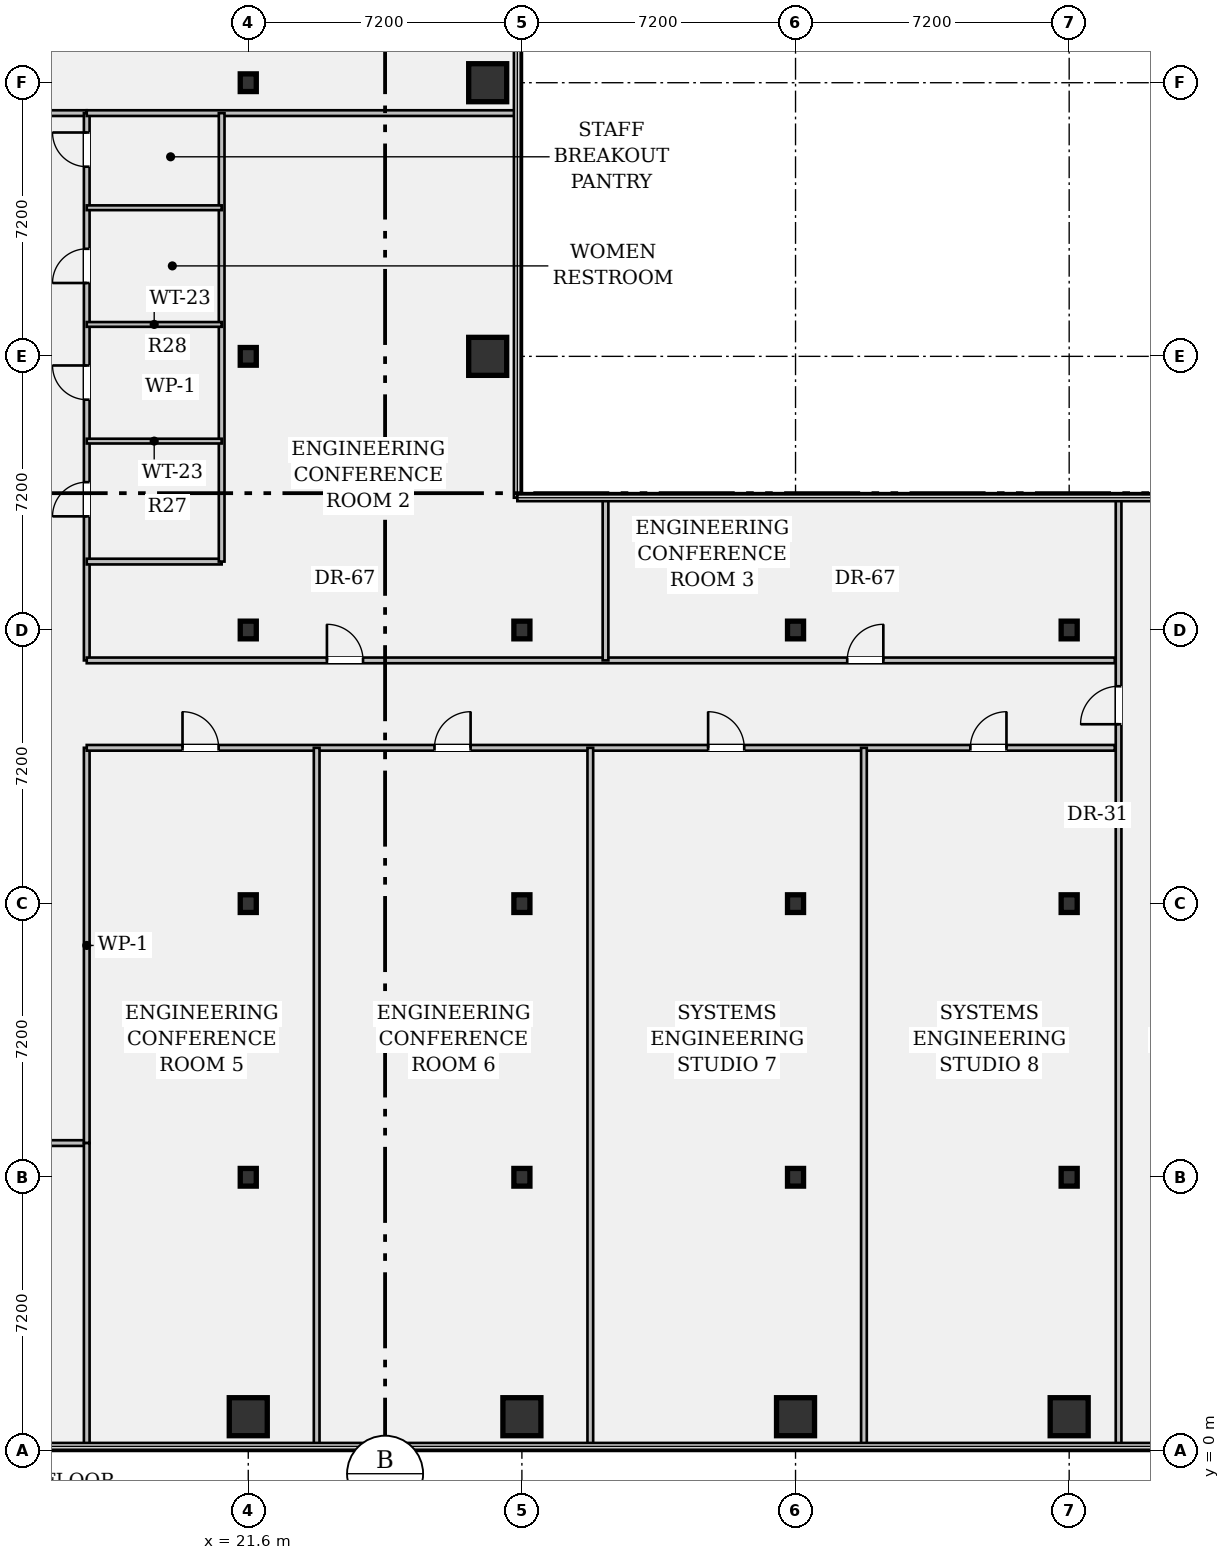
"""IFC4 building model, lengths in metres.
Left out: names, types, materials, properties, quantities, classifications, styles, units other than length and angle.
Written with IfcOpenShell. Run it as: python <this file> out.ifc"""

import sys

from ifc_helpers import new_model, si_unit, direction, frame, frame_2d, origin, origin_2d, place, context, subcontext, project, spatial, rectangle, hollow_rectangle, i_section, extrude, element, fill, save


model = new_model("IFC4")
c1 = context("Model", 3, precision=1e-05, world=origin(), true_north=direction((0.0, 1.0)))
c2 = subcontext(c1, "Body", "Model", "MODEL_VIEW")
j1 = project(units=[si_unit("LENGTHUNIT", "METRE"), si_unit("PLANEANGLEUNIT", "RADIAN")], contexts=[c1])
p1 = place(None, origin())
s1 = spatial("IfcSite", under=j1, at=p1, CompositionType="ELEMENT")
p2 = place(p1, origin())
s2 = spatial("IfcBuilding", under=s1, at=p2, CompositionType="ELEMENT")
p3 = place(p2, frame((0.0, 0.0, 54.25)))
s3 = spatial("IfcBuildingStorey", under=s2, at=p3, CompositionType="ELEMENT", Elevation=54.25)
p4 = place(p3, frame((21.6, 0.9, 0.0), z_axis=(0.0, 0.0, 1.0), x_axis=(1.0, 0.0, 0.0)))
e1 = element("IfcColumn", 1, at=p4, inside=s3, PredefinedType="COLUMN", context=c2, shape_type="SweptSolid", body=[
    extrude(hollow_rectangle(XDim=1.0, YDim=1.0, WallThickness=0.065, at=origin_2d()), origin(), (0.0, 0.0, 1.0), 3.57),
])
for number, where, z_axis, x_axis in (
    (2, (21.6, 7.2, 0.0), (0.0, 0.0, 1.0), (1.0, 0.0, 0.0)),
    (3, (21.6, 14.4, 0.0), (0.0, 0.0, 1.0), (1.0, 0.0, 0.0)),
    (4, (21.6, 21.6, 0.0), (0.0, 0.0, 1.0), (1.0, 0.0, 0.0)),
    (5, (21.6, 28.8, 0.0), (0.0, 0.0, 1.0), (1.0, 0.0, 0.0)),
    (6, (21.6, 36.0, 0.0), (0.0, 0.0, 1.0), (1.0, 0.0, 0.0)),
):
    element("IfcColumn", number, at=place(p3, frame(where, z_axis=z_axis, x_axis=x_axis)), inside=s3, PredefinedType="COLUMN", context=c2, shape_type="SweptSolid", body=[
        extrude(i_section(OverallWidth=0.422, OverallDepth=0.465, WebThickness=0.045, FlangeThickness=0.073, FilletRadius=0.018, at=origin_2d()), origin(), (0.0, 0.0, 1.0), 3.57),
    ])
for number, where, z_axis, x_axis in (
    (7, (27.9, 28.8, 0.0), (0.0, 0.0, 1.0), (1.0, 0.0, 0.0)),
    (8, (27.9, 36.0, 0.0), (0.0, 0.0, 1.0), (1.0, 0.0, 0.0)),
    (9, (28.8, 0.9, 0.0), (0.0, 0.0, 1.0), (1.0, 0.0, 0.0)),
):
    element("IfcColumn", number, at=place(p3, frame(where, z_axis=z_axis, x_axis=x_axis)), inside=s3, PredefinedType="COLUMN", context=c2, shape_type="SweptSolid", body=[
        extrude(hollow_rectangle(XDim=1.0, YDim=1.0, WallThickness=0.065, at=origin_2d()), origin(), (0.0, 0.0, 1.0), 3.57),
    ])
for number, where, z_axis, x_axis in (
    (10, (28.8, 7.2, 0.0), (0.0, 0.0, 1.0), (1.0, 0.0, 0.0)),
    (11, (28.8, 14.4, 0.0), (0.0, 0.0, 1.0), (1.0, 0.0, 0.0)),
    (12, (28.8, 21.6, 0.0), (0.0, 0.0, 1.0), (1.0, 0.0, 0.0)),
):
    element("IfcColumn", number, at=place(p3, frame(where, z_axis=z_axis, x_axis=x_axis)), inside=s3, PredefinedType="COLUMN", context=c2, shape_type="SweptSolid", body=[
        extrude(i_section(OverallWidth=0.422, OverallDepth=0.465, WebThickness=0.045, FlangeThickness=0.073, FilletRadius=0.018, at=origin_2d()), origin(), (0.0, 0.0, 1.0), 3.57),
    ])
p5 = place(p3, frame((36.0, 0.9, 0.0), z_axis=(0.0, 0.0, 1.0), x_axis=(1.0, 0.0, 0.0)))
e13 = element("IfcColumn", 13, at=p5, inside=s3, PredefinedType="COLUMN", context=c2, shape_type="SweptSolid", body=[
    extrude(hollow_rectangle(XDim=1.0, YDim=1.0, WallThickness=0.065, at=origin_2d()), origin(), (0.0, 0.0, 1.0), 3.57),
])
for number, where, z_axis, x_axis in (
    (14, (36.0, 7.2, 0.0), (0.0, 0.0, 1.0), (1.0, 0.0, 0.0)),
    (15, (36.0, 14.4, 0.0), (0.0, 0.0, 1.0), (1.0, 0.0, 0.0)),
    (16, (36.0, 21.6, 0.0), (0.0, 0.0, 1.0), (1.0, 0.0, 0.0)),
):
    element("IfcColumn", number, at=place(p3, frame(where, z_axis=z_axis, x_axis=x_axis)), inside=s3, PredefinedType="COLUMN", context=c2, shape_type="SweptSolid", body=[
        extrude(i_section(OverallWidth=0.422, OverallDepth=0.465, WebThickness=0.045, FlangeThickness=0.073, FilletRadius=0.018, at=origin_2d()), origin(), (0.0, 0.0, 1.0), 3.57),
    ])
p6 = place(p3, frame((43.2, 0.9, 0.0), z_axis=(0.0, 0.0, 1.0), x_axis=(1.0, 0.0, 0.0)))
e17 = element("IfcColumn", 17, at=p6, inside=s3, PredefinedType="COLUMN", context=c2, shape_type="SweptSolid", body=[
    extrude(hollow_rectangle(XDim=1.0, YDim=1.0, WallThickness=0.065, at=origin_2d()), origin(), (0.0, 0.0, 1.0), 3.57),
])
for number, where, z_axis, x_axis in (
    (18, (43.2, 7.2, 0.0), (0.0, 0.0, 1.0), (1.0, 0.0, 0.0)),
    (19, (43.2, 14.4, 0.0), (0.0, 0.0, 1.0), (1.0, 0.0, 0.0)),
    (20, (43.2, 21.6, 0.0), (0.0, 0.0, 1.0), (1.0, 0.0, 0.0)),
):
    element("IfcColumn", number, at=place(p3, frame(where, z_axis=z_axis, x_axis=x_axis)), inside=s3, PredefinedType="COLUMN", context=c2, shape_type="SweptSolid", body=[
        extrude(i_section(OverallWidth=0.422, OverallDepth=0.465, WebThickness=0.045, FlangeThickness=0.073, FilletRadius=0.018, at=origin_2d()), origin(), (0.0, 0.0, 1.0), 3.57),
    ])
p7 = place(p3, frame((14.4, 8.1, 0.0), z_axis=(0.0, 0.0, 1.0), x_axis=(1.0, 0.0, 0.0)))
e21 = element("IfcWall", 21, at=p7, inside=s3, PredefinedType="PARTITIONING", context=c2, shape_type="SweptSolid", body=[
    extrude(rectangle(XDim=2.95, YDim=0.15, at=frame_2d((1.475, 0.0))), origin(), (0.0, 0.0, 1.0), 3.088),
])
p8 = place(p7, frame((0.95, 0.0, 0.0)))
e22 = element("IfcOpeningElement", 22, at=p8, cuts=e21, PredefinedType="OPENING", context=c2, shape_type="SweptSolid", body=[
    extrude(rectangle(XDim=0.95, YDim=2.15, at=frame_2d((0.475, 1.075))), frame((0.0, 0.087, 0.0), z_axis=(0.0, -1.0, 0.0), x_axis=(1.0, 0.0, 0.0)), (0.0, 0.0, 1.0), 0.174),
])
p9 = place(p3, frame((14.4, 35.2, 0.0), z_axis=(0.0, 0.0, 1.0), x_axis=(1.0, 0.0, 0.0)))
e23 = element("IfcWall", 23, at=p9, inside=s3, PredefinedType="PARTITIONING", context=c2, shape_type="SweptSolid", body=[
    extrude(rectangle(XDim=2.95, YDim=0.15, at=frame_2d((1.475, 0.0))), origin(), (0.0, 0.0, 1.0), 3.088),
])
p10 = place(p9, frame((0.95, 0.0, 0.0)))
e24 = element("IfcOpeningElement", 24, at=p10, cuts=e23, PredefinedType="OPENING", context=c2, shape_type="SweptSolid", body=[
    extrude(rectangle(XDim=1.0, YDim=2.15, at=frame_2d((0.5, 1.075))), frame((0.0, 0.087, 0.0), z_axis=(0.0, -1.0, 0.0), x_axis=(1.0, 0.0, 0.0)), (0.0, 0.0, 1.0), 0.174),
])
p11 = place(p3, frame((17.35, 8.1, 0.0), z_axis=(0.0, 0.0, 1.0), x_axis=(0.0, 1.0, 0.0)))
e25 = element("IfcWall", 25, at=p11, inside=s3, PredefinedType="PARTITIONING", context=c2, shape_type="SweptSolid", body=[
    extrude(rectangle(XDim=10.4, YDim=0.15, at=frame_2d((5.2, 0.0))), origin(), (0.0, 0.0, 1.0), 2.699),
])
p12 = place(p3, frame((17.35, 20.8, 0.0), z_axis=(0.0, 0.0, 1.0), x_axis=(0.0, 1.0, 0.0)))
e26 = element("IfcWall", 26, at=p12, inside=s3, PredefinedType="PARTITIONING", context=c2, shape_type="SweptSolid", body=[
    extrude(rectangle(XDim=14.4, YDim=0.15, at=frame_2d((7.2, 0.0))), origin(), (0.0, 0.0, 1.0), 2.699),
])
p13 = place(p12, frame((3.79, 0.0, 0.0)))
e27 = element("IfcOpeningElement", 27, at=p13, cuts=e26, PredefinedType="OPENING", context=c2, shape_type="SweptSolid", body=[
    extrude(rectangle(XDim=0.9, YDim=2.15, at=frame_2d((0.45, 1.075))), frame((0.0, 0.087, 0.0), z_axis=(0.0, -1.0, 0.0), x_axis=(1.0, 0.0, 0.0)), (0.0, 0.0, 1.0), 0.174),
])
p14 = place(p12, frame((6.86, 0.0, 0.0)))
e28 = element("IfcOpeningElement", 28, at=p14, cuts=e26, PredefinedType="OPENING", context=c2, shape_type="SweptSolid", body=[
    extrude(rectangle(XDim=0.9, YDim=2.15, at=frame_2d((0.45, 1.075))), frame((0.0, 0.087, 0.0), z_axis=(0.0, -1.0, 0.0), x_axis=(1.0, 0.0, 0.0)), (0.0, 0.0, 1.0), 0.174),
])
p15 = place(p12, frame((9.93, 0.0, 0.0)))
e29 = element("IfcOpeningElement", 29, at=p15, cuts=e26, PredefinedType="OPENING", context=c2, shape_type="SweptSolid", body=[
    extrude(rectangle(XDim=0.9, YDim=2.15, at=frame_2d((0.45, 1.075))), frame((0.0, 0.087, 0.0), z_axis=(0.0, -1.0, 0.0), x_axis=(1.0, 0.0, 0.0)), (0.0, 0.0, 1.0), 0.174),
])
p16 = place(p12, frame((12.99, 0.0, 0.0)))
e30 = element("IfcOpeningElement", 30, at=p16, cuts=e26, PredefinedType="OPENING", context=c2, shape_type="SweptSolid", body=[
    extrude(rectangle(XDim=0.9, YDim=2.15, at=frame_2d((0.45, 1.075))), frame((0.0, 0.087, 0.0), z_axis=(0.0, -1.0, 0.0), x_axis=(1.0, 0.0, 0.0)), (0.0, 0.0, 1.0), 0.174),
])
p17 = place(p3, frame((17.35, 18.5, 0.0), z_axis=(0.0, 0.0, 1.0), x_axis=(1.0, 0.0, 0.0)))
e31 = element("IfcWall", 31, at=p17, inside=s3, PredefinedType="PARTITIONING", context=c2, shape_type="SweptSolid", body=[
    extrude(rectangle(XDim=27.05, YDim=0.15, at=frame_2d((13.525, 0.0))), origin(), (0.0, 0.0, 1.0), 2.699),
])
p18 = place(p17, frame((2.52, 0.0, 0.0)))
e32 = element("IfcOpeningElement", 32, at=p18, cuts=e31, PredefinedType="OPENING", context=c2, shape_type="SweptSolid", body=[
    extrude(rectangle(XDim=0.95, YDim=2.15, at=frame_2d((0.475, 1.075))), frame((0.0, 0.087, 0.0), z_axis=(0.0, -1.0, 0.0), x_axis=(1.0, 0.0, 0.0)), (0.0, 0.0, 1.0), 0.174),
])
p19 = place(p17, frame((9.15, 0.0, 0.0)))
e33 = element("IfcOpeningElement", 33, at=p19, cuts=e31, PredefinedType="OPENING", context=c2, shape_type="SweptSolid", body=[
    extrude(rectangle(XDim=0.95, YDim=2.15, at=frame_2d((0.475, 1.075))), frame((0.0, 0.087, 0.0), z_axis=(0.0, -1.0, 0.0), x_axis=(1.0, 0.0, 0.0)), (0.0, 0.0, 1.0), 0.174),
])
p20 = place(p17, frame((16.35, 0.0, 0.0)))
e34 = element("IfcOpeningElement", 34, at=p20, cuts=e31, PredefinedType="OPENING", context=c2, shape_type="SweptSolid", body=[
    extrude(rectangle(XDim=0.95, YDim=2.15, at=frame_2d((0.475, 1.075))), frame((0.0, 0.087, 0.0), z_axis=(0.0, -1.0, 0.0), x_axis=(1.0, 0.0, 0.0)), (0.0, 0.0, 1.0), 0.174),
])
p21 = place(p17, frame((23.25, 0.0, 0.0)))
e35 = element("IfcOpeningElement", 35, at=p21, cuts=e31, PredefinedType="OPENING", context=c2, shape_type="SweptSolid", body=[
    extrude(rectangle(XDim=0.95, YDim=2.15, at=frame_2d((0.475, 1.075))), frame((0.0, 0.087, 0.0), z_axis=(0.0, -1.0, 0.0), x_axis=(1.0, 0.0, 0.0)), (0.0, 0.0, 1.0), 0.174),
])
p22 = place(p3, frame((17.35, 20.8, 0.0), z_axis=(0.0, 0.0, 1.0), x_axis=(1.0, 0.0, 0.0)))
e36 = element("IfcWall", 36, at=p22, inside=s3, PredefinedType="PARTITIONING", context=c2, shape_type="SweptSolid", body=[
    extrude(rectangle(XDim=27.05, YDim=0.15, at=frame_2d((13.525, 0.0))), origin(), (0.0, 0.0, 1.0), 2.699),
])
p23 = place(p22, frame((6.32, 0.0, 0.0)))
e37 = element("IfcOpeningElement", 37, at=p23, cuts=e36, PredefinedType="OPENING", context=c2, shape_type="SweptSolid", body=[
    extrude(rectangle(XDim=0.95, YDim=2.15, at=frame_2d((0.475, 1.075))), frame((0.0, 0.087, 0.0), z_axis=(0.0, -1.0, 0.0), x_axis=(1.0, 0.0, 0.0)), (0.0, 0.0, 1.0), 0.174),
])
p24 = place(p22, frame((20.01, 0.0, 0.0)))
e38 = element("IfcOpeningElement", 38, at=p24, cuts=e36, PredefinedType="OPENING", context=c2, shape_type="SweptSolid", body=[
    extrude(rectangle(XDim=0.95, YDim=2.15, at=frame_2d((0.475, 1.075))), frame((0.0, 0.087, 0.0), z_axis=(0.0, -1.0, 0.0), x_axis=(1.0, 0.0, 0.0)), (0.0, 0.0, 1.0), 0.174),
])
p25 = place(p3, frame((44.5, 0.12, 0.0), z_axis=(0.0, 0.0, 1.0), x_axis=(0.0, 1.0, 0.0)))
e39 = element("IfcWall", 39, at=p25, inside=s3, PredefinedType="PARTITIONING", context=c2, shape_type="SweptSolid", body=[
    extrude(rectangle(XDim=24.96, YDim=0.15, at=frame_2d((12.48, 0.0))), origin(), (0.0, 0.0, 1.0), 2.699),
])
p26 = place(p25, frame((19.0, 0.0, 0.0)))
e40 = element("IfcOpeningElement", 40, at=p26, cuts=e39, PredefinedType="OPENING", context=c2, shape_type="SweptSolid", body=[
    extrude(rectangle(XDim=1.0, YDim=2.15, at=frame_2d((0.5, 1.075))), frame((0.0, 0.087, 0.0), z_axis=(0.0, -1.0, 0.0), x_axis=(1.0, 0.0, 0.0)), (0.0, 0.0, 1.0), 0.174),
])
p27 = place(p3, frame((17.35, 35.2, 0.0), z_axis=(0.0, 0.0, 1.0), x_axis=(1.0, 0.0, 0.0)))
e41 = element("IfcWall", 41, at=p27, inside=s3, PredefinedType="PARTITIONING", context=c2, shape_type="SweptSolid", body=[
    extrude(rectangle(XDim=11.33, YDim=0.15, at=frame_2d((5.665, 0.0))), origin(), (0.0, 0.0, 1.0), 2.699),
])
p28 = place(p3, frame((17.35, 23.4, 0.0), z_axis=(0.0, 0.0, 1.0), x_axis=(1.0, 0.0, 0.0)))
e42 = element("IfcWall", 42, at=p28, inside=s3, PredefinedType="PARTITIONING", context=c2, shape_type="SweptSolid", body=[
    extrude(rectangle(XDim=3.55, YDim=0.15, at=frame_2d((1.775, 0.0))), origin(), (0.0, 0.0, 1.0), 3.088),
])
p29 = place(p3, frame((20.9, 23.4, 0.0), z_axis=(0.0, 0.0, 1.0), x_axis=(0.0, 1.0, 0.0)))
e43 = element("IfcWall", 43, at=p29, inside=s3, PredefinedType="PARTITIONING", context=c2, shape_type="SweptSolid", body=[
    extrude(rectangle(XDim=11.8, YDim=0.15, at=frame_2d((5.9, 0.0))), origin(), (0.0, 0.0, 1.0), 2.699),
])
for number, where, z_axis, x_axis in (
    (44, (17.35, 26.57, 0.0), (0.0, 0.0, 1.0), (1.0, 0.0, 0.0)),
    (45, (17.35, 29.64, 0.0), (0.0, 0.0, 1.0), (1.0, 0.0, 0.0)),
    (46, (17.35, 32.71, 0.0), (0.0, 0.0, 1.0), (1.0, 0.0, 0.0)),
):
    element("IfcWall", number, at=place(p3, frame(where, z_axis=z_axis, x_axis=x_axis)), inside=s3, PredefinedType="PARTITIONING", context=c2, shape_type="SweptSolid", body=[
        extrude(rectangle(XDim=3.55, YDim=0.125, at=frame_2d((1.775, 0.0))), origin(), (0.0, 0.0, 1.0), 3.088),
    ])
p30 = place(p3, frame((31.0, 20.8, 0.0), z_axis=(0.0, 0.0, 1.0), x_axis=(0.0, 1.0, 0.0)))
e47 = element("IfcWall", 47, at=p30, inside=s3, PredefinedType="PARTITIONING", context=c2, shape_type="SweptSolid", body=[
    extrude(rectangle(XDim=4.25, YDim=0.15, at=frame_2d((2.125, 0.0))), origin(), (0.0, 0.0, 1.0), 2.699),
])
p31 = place(p3, frame((17.35, 0.12, 0.0), z_axis=(0.0, 0.0, 1.0), x_axis=(0.0, 1.0, 0.0)))
e48 = element("IfcWall", 48, at=p31, inside=s3, PredefinedType="PARTITIONING", context=c2, shape_type="SweptSolid", body=[
    extrude(rectangle(XDim=7.98, YDim=0.15, at=frame_2d((3.99, 0.0))), origin(), (0.0, 0.0, 1.0), 2.699),
])
for number, where, z_axis, x_axis in (
    (49, (23.4, 0.12, 0.0), (0.0, 0.0, 1.0), (0.0, 1.0, 0.0)),
    (50, (30.6, 0.12, 0.0), (0.0, 0.0, 1.0), (0.0, 1.0, 0.0)),
    (51, (37.8, 0.12, 0.0), (0.0, 0.0, 1.0), (0.0, 1.0, 0.0)),
):
    element("IfcWall", number, at=place(p3, frame(where, z_axis=z_axis, x_axis=x_axis)), inside=s3, PredefinedType="PARTITIONING", context=c2, shape_type="SweptSolid", body=[
        extrude(rectangle(XDim=18.38, YDim=0.15, at=frame_2d((9.19, 0.0))), origin(), (0.0, 0.0, 1.0), 2.699),
    ])
p32 = place(p13, origin())
e52 = element("IfcDoor", 52, at=p32, inside=s3, OperationType="SINGLE_SWING_LEFT", PredefinedType="DOOR", context=c2, shape_type="SweptSolid", body=[
    extrude(rectangle(XDim=0.9, YDim=2.15, at=frame_2d((0.45, 1.075))), frame((0.0, 0.025, 0.0), z_axis=(0.0, -1.0, 0.0), x_axis=(1.0, 0.0, 0.0)), (0.0, 0.0, 1.0), 0.05),
])
fill(e27, e52)
p33 = place(p14, origin())
e53 = element("IfcDoor", 53, at=p33, inside=s3, OperationType="SINGLE_SWING_RIGHT", PredefinedType="DOOR", context=c2, shape_type="SweptSolid", body=[
    extrude(rectangle(XDim=0.9, YDim=2.15, at=frame_2d((0.45, 1.075))), frame((0.0, 0.025, 0.0), z_axis=(0.0, -1.0, 0.0), x_axis=(1.0, 0.0, 0.0)), (0.0, 0.0, 1.0), 0.05),
])
fill(e28, e53)
p34 = place(p15, origin())
e54 = element("IfcDoor", 54, at=p34, inside=s3, OperationType="SINGLE_SWING_LEFT", PredefinedType="DOOR", context=c2, shape_type="SweptSolid", body=[
    extrude(rectangle(XDim=0.9, YDim=2.15, at=frame_2d((0.45, 1.075))), frame((0.0, 0.025, 0.0), z_axis=(0.0, -1.0, 0.0), x_axis=(1.0, 0.0, 0.0)), (0.0, 0.0, 1.0), 0.05),
])
fill(e29, e54)
p35 = place(p16, origin())
e55 = element("IfcDoor", 55, at=p35, inside=s3, OperationType="SINGLE_SWING_RIGHT", PredefinedType="DOOR", context=c2, shape_type="SweptSolid", body=[
    extrude(rectangle(XDim=0.9, YDim=2.15, at=frame_2d((0.45, 1.075))), frame((0.0, 0.025, 0.0), z_axis=(0.0, -1.0, 0.0), x_axis=(1.0, 0.0, 0.0)), (0.0, 0.0, 1.0), 0.05),
])
fill(e30, e55)
p36 = place(p23, origin())
e56 = element("IfcDoor", 56, at=p36, inside=s3, OperationType="SINGLE_SWING_LEFT", PredefinedType="DOOR", context=c2, shape_type="SweptSolid", body=[
    extrude(rectangle(XDim=0.95, YDim=2.15, at=frame_2d((0.475, 1.075))), frame((0.0, 0.025, 0.0), z_axis=(0.0, -1.0, 0.0), x_axis=(1.0, 0.0, 0.0)), (0.0, 0.0, 1.0), 0.05),
])
fill(e37, e56)
p37 = place(p24, origin())
e57 = element("IfcDoor", 57, at=p37, inside=s3, OperationType="SINGLE_SWING_RIGHT", PredefinedType="DOOR", context=c2, shape_type="SweptSolid", body=[
    extrude(rectangle(XDim=0.95, YDim=2.15, at=frame_2d((0.475, 1.075))), frame((0.0, 0.025, 0.0), z_axis=(0.0, -1.0, 0.0), x_axis=(1.0, 0.0, 0.0)), (0.0, 0.0, 1.0), 0.05),
])
fill(e38, e57)
p38 = place(p18, origin())
e58 = element("IfcDoor", 58, at=p38, inside=s3, OperationType="SINGLE_SWING_LEFT", PredefinedType="DOOR", context=c2, shape_type="SweptSolid", body=[
    extrude(rectangle(XDim=0.95, YDim=2.15, at=frame_2d((0.475, 1.075))), frame((0.0, 0.025, 0.0), z_axis=(0.0, -1.0, 0.0), x_axis=(1.0, 0.0, 0.0)), (0.0, 0.0, 1.0), 0.05),
])
fill(e32, e58)
p39 = place(p19, origin())
e59 = element("IfcDoor", 59, at=p39, inside=s3, OperationType="SINGLE_SWING_RIGHT", PredefinedType="DOOR", context=c2, shape_type="SweptSolid", body=[
    extrude(rectangle(XDim=0.95, YDim=2.15, at=frame_2d((0.475, 1.075))), frame((0.0, 0.025, 0.0), z_axis=(0.0, -1.0, 0.0), x_axis=(1.0, 0.0, 0.0)), (0.0, 0.0, 1.0), 0.05),
])
fill(e33, e59)
p40 = place(p20, origin())
e60 = element("IfcDoor", 60, at=p40, inside=s3, OperationType="SINGLE_SWING_LEFT", PredefinedType="DOOR", context=c2, shape_type="SweptSolid", body=[
    extrude(rectangle(XDim=0.95, YDim=2.15, at=frame_2d((0.475, 1.075))), frame((0.0, 0.025, 0.0), z_axis=(0.0, -1.0, 0.0), x_axis=(1.0, 0.0, 0.0)), (0.0, 0.0, 1.0), 0.05),
])
fill(e34, e60)
p41 = place(p21, origin())
e61 = element("IfcDoor", 61, at=p41, inside=s3, OperationType="SINGLE_SWING_RIGHT", PredefinedType="DOOR", context=c2, shape_type="SweptSolid", body=[
    extrude(rectangle(XDim=0.95, YDim=2.15, at=frame_2d((0.475, 1.075))), frame((0.0, 0.025, 0.0), z_axis=(0.0, -1.0, 0.0), x_axis=(1.0, 0.0, 0.0)), (0.0, 0.0, 1.0), 0.05),
])
fill(e35, e61)
p42 = place(p26, origin())
e62 = element("IfcDoor", 62, at=p42, inside=s3, OperationType="SINGLE_SWING_LEFT", PredefinedType="DOOR", context=c2, shape_type="SweptSolid", body=[
    extrude(rectangle(XDim=1.0, YDim=2.15, at=frame_2d((0.5, 1.075))), frame((0.0, 0.025, 0.0), z_axis=(0.0, -1.0, 0.0), x_axis=(1.0, 0.0, 0.0)), (0.0, 0.0, 1.0), 0.05),
])
fill(e40, e62)
save(model, sys.argv[1])
